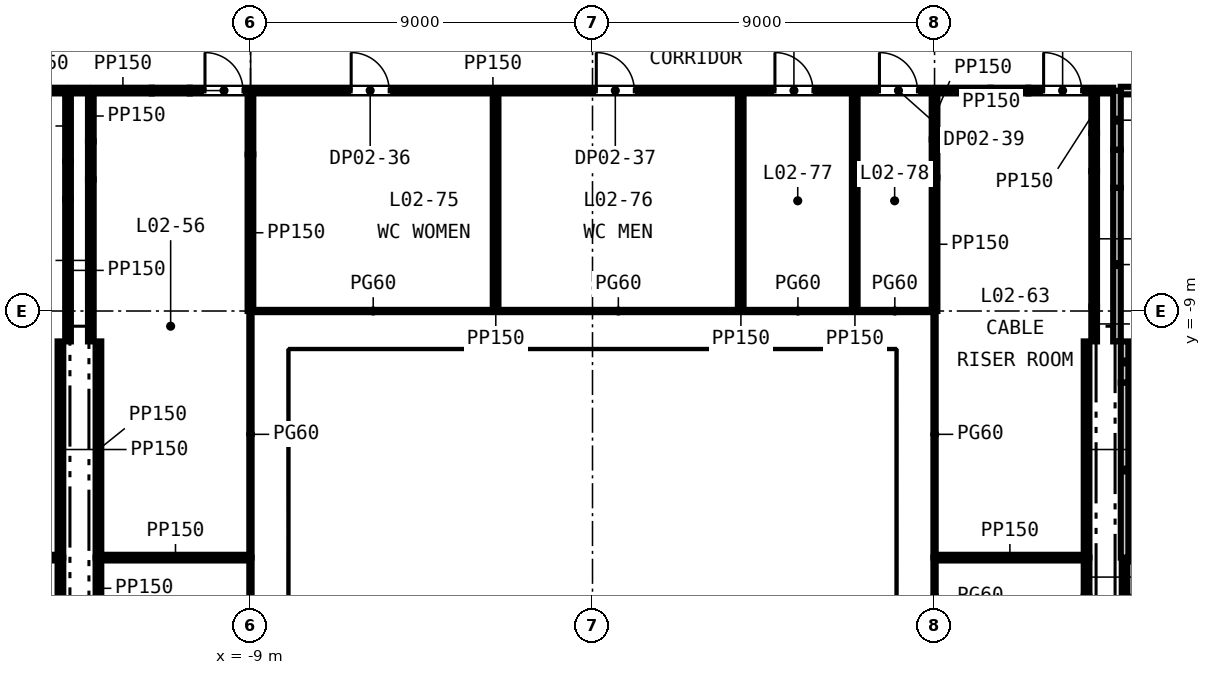
"""IFC4 building model, lengths in metres.
Left out: names, types, materials, properties, quantities, classifications, styles, units other than length and angle.
Written with IfcOpenShell. Run it as: python <this file> out.ifc"""

import sys

from ifc_helpers import new_model, si_unit, direction, frame, frame_2d, origin, place, context, subcontext, project, spatial, rectangle, extrude, element, fill, save


model = new_model("IFC4")
c1 = context("Model", 3, precision=1e-05, world=origin(), true_north=direction((0.0, 1.0)))
c2 = subcontext(c1, "Body", "Model", "MODEL_VIEW")
j1 = project(units=[si_unit("LENGTHUNIT", "METRE"), si_unit("PLANEANGLEUNIT", "RADIAN")], contexts=[c1])
p1 = place(None, origin())
s1 = spatial("IfcSite", under=j1, at=p1, CompositionType="ELEMENT")
p2 = place(p1, origin())
s2 = spatial("IfcBuilding", under=s1, at=p2, CompositionType="ELEMENT")
p3 = place(p2, frame((0.0, 0.0, 18.0)))
s3 = spatial("IfcBuildingStorey", under=s2, at=p3, CompositionType="ELEMENT", Elevation=18.0)
p4 = place(p3, frame((-21.925, -15.489, 0.0), z_axis=(0.0, 0.0, 1.0), x_axis=(1.0, 0.0, 0.0)))
e1 = element("IfcWall", 1, at=p4, inside=s3, PredefinedType="PARTITIONING", context=c2, shape_type="SweptSolid", body=[
    extrude(rectangle(XDim=7.85, YDim=0.15, at=frame_2d((3.925, 0.0))), origin(), (0.0, 0.0, 1.0), 4.2),
])
for number, where, z_axis, x_axis in (
    (2, (-12.925, -15.489, 0.0), (0.0, 0.0, 1.0), (1.0, 0.0, 0.0)),
    (3, (9.03, -15.489, 0.0), (0.0, 0.0, 1.0), (1.0, 0.0, 0.0)),
):
    element("IfcWall", number, at=place(p3, frame(where, z_axis=z_axis, x_axis=x_axis)), inside=s3, PredefinedType="PARTITIONING", context=c2, shape_type="SweptSolid", body=[
        extrude(rectangle(XDim=3.895, YDim=0.15, at=frame_2d((1.948, 0.0))), origin(), (0.0, 0.0, 1.0), 4.2),
    ])
p5 = place(p3, frame((14.1, -15.489, 0.0), z_axis=(0.0, 0.0, 1.0), x_axis=(1.0, 0.0, 0.0)))
e4 = element("IfcWall", 4, at=p5, inside=s3, PredefinedType="PARTITIONING", context=c2, shape_type="SweptSolid", body=[
    extrude(rectangle(XDim=4.44, YDim=0.2, at=frame_2d((2.22, 0.0))), origin(), (0.0, 0.0, 1.0), 4.2),
])
for number, where, z_axis, x_axis in (
    (5, (-8.925, -9.0, 0.0), (0.0, 0.0, 1.0), (1.0, 0.0, 0.0)),
    (6, (-2.475, -9.0, 0.0), (0.0, 0.0, 1.0), (1.0, 0.0, 0.0)),
):
    element("IfcWall", number, at=place(p3, frame(where, z_axis=z_axis, x_axis=x_axis)), inside=s3, PredefinedType="PARTITIONING", context=c2, shape_type="SweptSolid", body=[
        extrude(rectangle(XDim=6.3, YDim=0.06, at=frame_2d((3.15, 0.0))), origin(), (0.0, 0.0, 1.0), 4.2),
    ])
p6 = place(p3, frame((3.975, -9.0, 0.0), z_axis=(0.0, 0.0, 1.0), x_axis=(1.0, 0.0, 0.0)))
e7 = element("IfcWall", 7, at=p6, inside=s3, PredefinedType="PARTITIONING", context=c2, shape_type="SweptSolid", body=[
    extrude(rectangle(XDim=2.85, YDim=0.06, at=frame_2d((1.425, 0.0))), origin(), (0.0, 0.0, 1.0), 4.2),
])
p7 = place(p3, frame((6.975, -9.0, 0.0), z_axis=(0.0, 0.0, 1.0), x_axis=(1.0, 0.0, 0.0)))
e8 = element("IfcWall", 8, at=p7, inside=s3, PredefinedType="PARTITIONING", context=c2, shape_type="SweptSolid", body=[
    extrude(rectangle(XDim=1.95, YDim=0.06, at=frame_2d((0.975, 0.0))), origin(), (0.0, 0.0, 1.0), 4.2),
])
p8 = place(p3, frame((-15.228, -3.2, 0.0), z_axis=(0.0, 0.0, 1.0), x_axis=(1.0, 0.0, 0.0)))
e9 = element("IfcWall", 9, at=p8, inside=s3, PredefinedType="PARTITIONING", context=c2, shape_type="SweptSolid", body=[
    extrude(rectangle(XDim=1.353, YDim=0.15, at=frame_2d((0.676, 0.0))), origin(), (0.0, 0.0, 1.0), 4.2),
])
p9 = place(p3, frame((-13.725, -3.2, 0.0), z_axis=(0.0, 0.0, 1.0), x_axis=(1.0, 0.0, 0.0)))
e10 = element("IfcWall", 10, at=p9, inside=s3, PredefinedType="PARTITIONING", context=c2, shape_type="SweptSolid", body=[
    extrude(rectangle(XDim=0.45, YDim=0.15, at=frame_2d((0.225, 0.0))), origin(), (0.0, 0.0, 1.0), 4.2),
])
p10 = place(p3, frame((-13.125, -3.2, 0.0), z_axis=(0.0, 0.0, 1.0), x_axis=(1.0, 0.0, 0.0)))
e11 = element("IfcWall", 11, at=p10, inside=s3, PredefinedType="PARTITIONING", context=c2, shape_type="SweptSolid", body=[
    extrude(rectangle(XDim=1.529, YDim=0.15, at=frame_2d((0.764, 0.0))), origin(), (0.0, 0.0, 1.0), 4.2),
])
p11 = place(p3, frame((-11.596, -3.2, 0.0), z_axis=(0.0, 0.0, 1.0), x_axis=(1.0, 0.0, 0.0)))
e12 = element("IfcWall", 12, at=p11, inside=s3, PredefinedType="PARTITIONING", context=c2, shape_type="SweptSolid", body=[
    extrude(rectangle(XDim=1.0, YDim=0.15, at=frame_2d((0.5, 0.0))), origin(), (0.0, 0.0, 1.0), 3.298),
])
p12 = place(p3, frame((-10.596, -3.2, 0.0), z_axis=(0.0, 0.0, 1.0), x_axis=(1.0, 0.0, 0.0)))
e13 = element("IfcWall", 13, at=p12, inside=s3, PredefinedType="PARTITIONING", context=c2, shape_type="SweptSolid", body=[
    extrude(rectangle(XDim=21.066, YDim=0.15, at=frame_2d((10.533, 0.0))), origin(), (0.0, 0.0, 1.0), 4.2),
])
p13 = place(p12, frame((0.4, 0.0, 0.0)))
e14 = element("IfcOpeningElement", 14, at=p13, cuts=e13, PredefinedType="OPENING", context=c2, shape_type="SweptSolid", body=[
    extrude(rectangle(XDim=1.0, YDim=2.1, at=frame_2d((0.5, 1.05))), frame((0.0, 0.085, 0.0), z_axis=(0.0, -1.0, 0.0), x_axis=(1.0, 0.0, 0.0)), (0.0, 0.0, 1.0), 0.17),
])
p14 = place(p12, frame((4.246, 0.0, 0.0)))
e15 = element("IfcOpeningElement", 15, at=p14, cuts=e13, PredefinedType="OPENING", context=c2, shape_type="SweptSolid", body=[
    extrude(rectangle(XDim=1.0, YDim=2.1, at=frame_2d((0.5, 1.05))), frame((0.0, 0.085, 0.0), z_axis=(0.0, -1.0, 0.0), x_axis=(1.0, 0.0, 0.0)), (0.0, 0.0, 1.0), 0.17),
])
p15 = place(p12, frame((10.696, 0.0, 0.0)))
e16 = element("IfcOpeningElement", 16, at=p15, cuts=e13, PredefinedType="OPENING", context=c2, shape_type="SweptSolid", body=[
    extrude(rectangle(XDim=1.0, YDim=2.1, at=frame_2d((0.5, 1.05))), frame((0.0, 0.085, 0.0), z_axis=(0.0, -1.0, 0.0), x_axis=(1.0, 0.0, 0.0)), (0.0, 0.0, 1.0), 0.17),
])
p16 = place(p12, frame((15.396, 0.0, 0.0)))
e17 = element("IfcOpeningElement", 17, at=p16, cuts=e13, PredefinedType="OPENING", context=c2, shape_type="SweptSolid", body=[
    extrude(rectangle(XDim=1.0, YDim=2.1, at=frame_2d((0.5, 1.05))), frame((0.0, 0.085, 0.0), z_axis=(0.0, -1.0, 0.0), x_axis=(1.0, 0.0, 0.0)), (0.0, 0.0, 1.0), 0.17),
])
p17 = place(p12, frame((18.146, 0.0, 0.0)))
e18 = element("IfcOpeningElement", 18, at=p17, cuts=e13, PredefinedType="OPENING", context=c2, shape_type="SweptSolid", body=[
    extrude(rectangle(XDim=1.0, YDim=2.1, at=frame_2d((0.5, 1.05))), frame((0.0, 0.085, 0.0), z_axis=(0.0, -1.0, 0.0), x_axis=(1.0, 0.0, 0.0)), (0.0, 0.0, 1.0), 0.17),
])
p18 = place(p3, frame((10.47, -3.2, 0.0), z_axis=(0.0, 0.0, 1.0), x_axis=(1.0, 0.0, 0.0)))
e19 = element("IfcWall", 19, at=p18, inside=s3, PredefinedType="PARTITIONING", context=c2, shape_type="SweptSolid", body=[
    extrude(rectangle(XDim=1.0, YDim=0.15, at=frame_2d((0.5, 0.0))), origin(), (0.0, 0.0, 1.0), 3.298),
])
p19 = place(p3, frame((11.47, -3.2, 0.0), z_axis=(0.0, 0.0, 1.0), x_axis=(1.0, 0.0, 0.0)))
e20 = element("IfcWall", 20, at=p19, inside=s3, PredefinedType="PARTITIONING", context=c2, shape_type="SweptSolid", body=[
    extrude(rectangle(XDim=1.655, YDim=0.15, at=frame_2d((0.828, 0.0))), origin(), (0.0, 0.0, 1.0), 4.2),
])
p20 = place(p19, frame((0.4, 0.0, 0.0)))
e21 = element("IfcOpeningElement", 21, at=p20, cuts=e20, PredefinedType="OPENING", context=c2, shape_type="SweptSolid", body=[
    extrude(rectangle(XDim=1.0, YDim=2.1, at=frame_2d((0.5, 1.05))), frame((0.0, 0.085, 0.0), z_axis=(0.0, -1.0, 0.0), x_axis=(1.0, 0.0, 0.0)), (0.0, 0.0, 1.0), 0.17),
])
p21 = place(p3, frame((13.275, -3.2, 0.0), z_axis=(0.0, 0.0, 1.0), x_axis=(1.0, 0.0, 0.0)))
e22 = element("IfcWall", 22, at=p21, inside=s3, PredefinedType="PARTITIONING", context=c2, shape_type="SweptSolid", body=[
    extrude(rectangle(XDim=0.425, YDim=0.15, at=frame_2d((0.212, 0.0))), origin(), (0.0, 0.0, 1.0), 4.2),
])
p22 = place(p3, frame((13.9, -3.2, 0.0), z_axis=(0.0, 0.0, 1.0), x_axis=(1.0, 0.0, 0.0)))
e23 = element("IfcWall", 23, at=p22, inside=s3, PredefinedType="PARTITIONING", context=c2, shape_type="SweptSolid", body=[
    extrude(rectangle(XDim=2.66, YDim=0.2, at=frame_2d((1.33, 0.0))), origin(), (0.0, 0.0, 1.0), 4.2),
])
p23 = place(p22, frame((0.4, 0.0, 0.0)))
e24 = element("IfcOpeningElement", 24, at=p23, cuts=e23, PredefinedType="OPENING", context=c2, shape_type="SweptSolid", body=[
    extrude(rectangle(XDim=1.8, YDim=2.4, at=frame_2d((0.9, 1.2))), frame((0.0, 0.11, 0.0), z_axis=(0.0, -1.0, 0.0), x_axis=(1.0, 0.0, 0.0)), (0.0, 0.0, 1.0), 0.22),
])
p24 = place(p3, frame((-14.0, -17.961, 0.0), z_axis=(0.0, 0.0, 1.0), x_axis=(0.0, 1.0, 0.0)))
e25 = element("IfcWall", 25, at=p24, inside=s3, PredefinedType="PARTITIONING", context=c2, shape_type="SweptSolid", body=[
    extrude(rectangle(XDim=2.47, YDim=0.15, at=frame_2d((1.235, 0.0))), origin(), (0.0, 0.0, 1.0), 4.2),
])
p25 = place(p3, frame((-14.0, -15.489, 0.0), z_axis=(0.0, 0.0, 1.0), x_axis=(0.0, 1.0, 0.0)))
e26 = element("IfcWall", 26, at=p25, inside=s3, PredefinedType="PARTITIONING", context=c2, shape_type="SweptSolid", body=[
    extrude(rectangle(XDim=5.688, YDim=0.15, at=frame_2d((2.844, 0.0))), origin(), (0.0, 0.0, 1.0), 4.2),
])
p26 = place(p3, frame((-13.8, -9.8, 0.0), z_axis=(0.0, 0.0, 1.0), x_axis=(0.0, 1.0, 0.0)))
e27 = element("IfcWall", 27, at=p26, inside=s3, PredefinedType="PARTITIONING", context=c2, shape_type="SweptSolid", body=[
    extrude(rectangle(XDim=3.738, YDim=0.15, at=frame_2d((1.869, 0.0))), origin(), (0.0, 0.0, 1.0), 4.2),
])
p27 = place(p3, frame((-13.8, -6.062, 0.0), z_axis=(0.0, 0.0, 1.0), x_axis=(0.0, 1.0, 0.0)))
e28 = element("IfcWall", 28, at=p27, inside=s3, PredefinedType="PARTITIONING", context=c2, shape_type="SweptSolid", body=[
    extrude(rectangle(XDim=1.0, YDim=0.15, at=frame_2d((0.5, 0.0))), origin(), (0.0, 0.0, 1.0), 3.298),
])
p28 = place(p3, frame((-13.8, -5.062, 0.0), z_axis=(0.0, 0.0, 1.0), x_axis=(0.0, 1.0, 0.0)))
e29 = element("IfcWall", 29, at=p28, inside=s3, PredefinedType="PARTITIONING", context=c2, shape_type="SweptSolid", body=[
    extrude(rectangle(XDim=1.861, YDim=0.15, at=frame_2d((0.931, 0.0))), origin(), (0.0, 0.0, 1.0), 4.2),
])
p29 = place(p3, frame((-13.2, -9.8, 0.0), z_axis=(0.0, 0.0, 1.0), x_axis=(0.0, 1.0, 0.0)))
e30 = element("IfcWall", 30, at=p29, inside=s3, PredefinedType="PARTITIONING", context=c2, shape_type="SweptSolid", body=[
    extrude(rectangle(XDim=4.262, YDim=0.15, at=frame_2d((2.131, 0.0))), origin(), (0.0, 0.0, 1.0), 4.2),
])
p30 = place(p3, frame((-13.2, -5.538, 0.0), z_axis=(0.0, 0.0, 1.0), x_axis=(0.0, 1.0, 0.0)))
e31 = element("IfcWall", 31, at=p30, inside=s3, PredefinedType="PARTITIONING", context=c2, shape_type="SweptSolid", body=[
    extrude(rectangle(XDim=1.0, YDim=0.15, at=frame_2d((0.5, 0.0))), origin(), (0.0, 0.0, 1.0), 3.298),
])
p31 = place(p3, frame((-13.2, -4.538, 0.0), z_axis=(0.0, 0.0, 1.0), x_axis=(0.0, 1.0, 0.0)))
e32 = element("IfcWall", 32, at=p31, inside=s3, PredefinedType="PARTITIONING", context=c2, shape_type="SweptSolid", body=[
    extrude(rectangle(XDim=1.337, YDim=0.15, at=frame_2d((0.668, 0.0))), origin(), (0.0, 0.0, 1.0), 4.2),
])
p32 = place(p3, frame((-13.0, -17.102, 0.0), z_axis=(0.0, 0.0, 1.0), x_axis=(0.0, 1.0, 0.0)))
e33 = element("IfcWall", 33, at=p32, inside=s3, PredefinedType="PARTITIONING", context=c2, shape_type="SweptSolid", body=[
    extrude(rectangle(XDim=1.612, YDim=0.15, at=frame_2d((0.806, 0.0))), origin(), (0.0, 0.0, 1.0), 3.749),
])
p33 = place(p3, frame((-13.0, -15.489, 0.0), z_axis=(0.0, 0.0, 1.0), x_axis=(0.0, 1.0, 0.0)))
e34 = element("IfcWall", 34, at=p33, inside=s3, PredefinedType="PARTITIONING", context=c2, shape_type="SweptSolid", body=[
    extrude(rectangle(XDim=5.688, YDim=0.15, at=frame_2d((2.844, 0.0))), origin(), (0.0, 0.0, 1.0), 4.2),
])
p34 = place(p3, frame((-9.0, -18.321, 0.0), z_axis=(0.0, 0.0, 1.0), x_axis=(0.0, 1.0, 0.0)))
e35 = element("IfcWall", 35, at=p34, inside=s3, PredefinedType="PARTITIONING", context=c2, shape_type="SweptSolid", body=[
    extrude(rectangle(XDim=2.831, YDim=0.06, at=frame_2d((1.416, 0.0))), origin(), (0.0, 0.0, 1.0), 4.2),
])
p35 = place(p3, frame((-9.0, -15.489, 0.0), z_axis=(0.0, 0.0, 1.0), x_axis=(0.0, 1.0, 0.0)))
e36 = element("IfcWall", 36, at=p35, inside=s3, PredefinedType="PARTITIONING", context=c2, shape_type="SweptSolid", body=[
    extrude(rectangle(XDim=6.488, YDim=0.06, at=frame_2d((3.244, 0.0))), origin(), (0.0, 0.0, 1.0), 4.2),
])
p36 = place(p3, frame((-9.0, -9.0, 0.0), z_axis=(0.0, 0.0, 1.0), x_axis=(0.0, 1.0, 0.0)))
e37 = element("IfcWall", 37, at=p36, inside=s3, PredefinedType="PARTITIONING", context=c2, shape_type="SweptSolid", body=[
    extrude(rectangle(XDim=4.119, YDim=0.15, at=frame_2d((2.06, 0.0))), origin(), (0.0, 0.0, 1.0), 4.2),
])
p37 = place(p3, frame((-9.0, -4.881, 0.0), z_axis=(0.0, 0.0, 1.0), x_axis=(0.0, 1.0, 0.0)))
e38 = element("IfcWall", 38, at=p37, inside=s3, PredefinedType="PARTITIONING", context=c2, shape_type="SweptSolid", body=[
    extrude(rectangle(XDim=1.606, YDim=0.15, at=frame_2d((0.803, 0.0))), origin(), (0.0, 0.0, 1.0), 3.6),
])
for number, where, z_axis, x_axis in (
    (39, (-2.55, -9.0, 0.0), (0.0, 0.0, 1.0), (0.0, 1.0, 0.0)),
    (40, (3.9, -9.0, 0.0), (0.0, 0.0, 1.0), (0.0, 1.0, 0.0)),
    (41, (6.9, -9.0, 0.0), (0.0, 0.0, 1.0), (0.0, 1.0, 0.0)),
):
    element("IfcWall", number, at=place(p3, frame(where, z_axis=z_axis, x_axis=x_axis)), inside=s3, PredefinedType="PARTITIONING", context=c2, shape_type="SweptSolid", body=[
        extrude(rectangle(XDim=5.725, YDim=0.15, at=frame_2d((2.863, 0.0))), origin(), (0.0, 0.0, 1.0), 4.2),
    ])
p38 = place(p3, frame((9.0, -17.525, 0.0), z_axis=(0.0, 0.0, 1.0), x_axis=(0.0, 1.0, 0.0)))
e42 = element("IfcWall", 42, at=p38, inside=s3, PredefinedType="PARTITIONING", context=c2, shape_type="SweptSolid", body=[
    extrude(rectangle(XDim=2.034, YDim=0.06, at=frame_2d((1.017, 0.0))), origin(), (0.0, 0.0, 1.0), 4.2),
])
p39 = place(p3, frame((9.0, -15.489, 0.0), z_axis=(0.0, 0.0, 1.0), x_axis=(0.0, 1.0, 0.0)))
e43 = element("IfcWall", 43, at=p39, inside=s3, PredefinedType="PARTITIONING", context=c2, shape_type="SweptSolid", body=[
    extrude(rectangle(XDim=6.488, YDim=0.06, at=frame_2d((3.244, 0.0))), origin(), (0.0, 0.0, 1.0), 4.2),
])
p40 = place(p3, frame((9.0, -9.0, 0.0), z_axis=(0.0, 0.0, 1.0), x_axis=(0.0, 1.0, 0.0)))
e44 = element("IfcWall", 44, at=p40, inside=s3, PredefinedType="PARTITIONING", context=c2, shape_type="SweptSolid", body=[
    extrude(rectangle(XDim=3.513, YDim=0.15, at=frame_2d((1.756, 0.0))), origin(), (0.0, 0.0, 1.0), 4.2),
])
p41 = place(p3, frame((9.0, -5.487, 0.0), z_axis=(0.0, 0.0, 1.0), x_axis=(0.0, 1.0, 0.0)))
e45 = element("IfcWall", 45, at=p41, inside=s3, PredefinedType="PARTITIONING", context=c2, shape_type="SweptSolid", body=[
    extrude(rectangle(XDim=1.0, YDim=0.15, at=frame_2d((0.5, 0.0))), origin(), (0.0, 0.0, 1.0), 3.451),
])
p42 = place(p3, frame((9.0, -4.487, 0.0), z_axis=(0.0, 0.0, 1.0), x_axis=(0.0, 1.0, 0.0)))
e46 = element("IfcWall", 46, at=p42, inside=s3, PredefinedType="PARTITIONING", context=c2, shape_type="SweptSolid", body=[
    extrude(rectangle(XDim=1.212, YDim=0.15, at=frame_2d((0.606, 0.0))), origin(), (0.0, 0.0, 1.0), 4.2),
])
p43 = place(p3, frame((13.0, -16.511, 0.0), z_axis=(0.0, 0.0, 1.0), x_axis=(0.0, 1.0, 0.0)))
e47 = element("IfcWall", 47, at=p43, inside=s3, PredefinedType="PARTITIONING", context=c2, shape_type="SweptSolid", body=[
    extrude(rectangle(XDim=1.021, YDim=0.15, at=frame_2d((0.51, 0.0))), origin(), (0.0, 0.0, 1.0), 3.797),
])
p44 = place(p3, frame((13.0, -15.489, 0.0), z_axis=(0.0, 0.0, 1.0), x_axis=(0.0, 1.0, 0.0)))
e48 = element("IfcWall", 48, at=p44, inside=s3, PredefinedType="PARTITIONING", context=c2, shape_type="SweptSolid", body=[
    extrude(rectangle(XDim=5.688, YDim=0.15, at=frame_2d((2.844, 0.0))), origin(), (0.0, 0.0, 1.0), 4.2),
])
p45 = place(p3, frame((13.2, -9.8, 0.0), z_axis=(0.0, 0.0, 1.0), x_axis=(0.0, 1.0, 0.0)))
e49 = element("IfcWall", 49, at=p45, inside=s3, PredefinedType="PARTITIONING", context=c2, shape_type="SweptSolid", body=[
    extrude(rectangle(XDim=0.92, YDim=0.15, at=frame_2d((0.46, 0.0))), origin(), (0.0, 0.0, 1.0), 3.451),
])
p46 = place(p3, frame((13.2, -8.88, 0.0), z_axis=(0.0, 0.0, 1.0), x_axis=(0.0, 1.0, 0.0)))
e50 = element("IfcWall", 50, at=p46, inside=s3, PredefinedType="PARTITIONING", context=c2, shape_type="SweptSolid", body=[
    extrude(rectangle(XDim=3.56, YDim=0.15, at=frame_2d((1.78, 0.0))), origin(), (0.0, 0.0, 1.0), 4.2),
])
p47 = place(p3, frame((13.2, -5.32, 0.0), z_axis=(0.0, 0.0, 1.0), x_axis=(0.0, 1.0, 0.0)))
e51 = element("IfcWall", 51, at=p47, inside=s3, PredefinedType="PARTITIONING", context=c2, shape_type="SweptSolid", body=[
    extrude(rectangle(XDim=1.0, YDim=0.15, at=frame_2d((0.5, 0.0))), origin(), (0.0, 0.0, 1.0), 3.298),
])
p48 = place(p3, frame((13.2, -4.32, 0.0), z_axis=(0.0, 0.0, 1.0), x_axis=(0.0, 1.0, 0.0)))
e52 = element("IfcWall", 52, at=p48, inside=s3, PredefinedType="PARTITIONING", context=c2, shape_type="SweptSolid", body=[
    extrude(rectangle(XDim=1.119, YDim=0.15, at=frame_2d((0.56, 0.0))), origin(), (0.0, 0.0, 1.0), 4.2),
])
p49 = place(p3, frame((13.8, -9.8, 0.0), z_axis=(0.0, 0.0, 1.0), x_axis=(0.0, 1.0, 0.0)))
e53 = element("IfcWall", 53, at=p49, inside=s3, PredefinedType="PARTITIONING", context=c2, shape_type="SweptSolid", body=[
    extrude(rectangle(XDim=4.044, YDim=0.2, at=frame_2d((2.022, 0.0))), origin(), (0.0, 0.0, 1.0), 4.2),
])
p50 = place(p3, frame((13.8, -5.756, 0.0), z_axis=(0.0, 0.0, 1.0), x_axis=(0.0, 1.0, 0.0)))
e54 = element("IfcWall", 54, at=p50, inside=s3, PredefinedType="PARTITIONING", context=c2, shape_type="SweptSolid", body=[
    extrude(rectangle(XDim=1.0, YDim=0.2, at=frame_2d((0.5, 0.0))), origin(), (0.0, 0.0, 1.0), 3.298),
])
p51 = place(p3, frame((13.8, -4.756, 0.0), z_axis=(0.0, 0.0, 1.0), x_axis=(0.0, 1.0, 0.0)))
e55 = element("IfcWall", 55, at=p51, inside=s3, PredefinedType="PARTITIONING", context=c2, shape_type="SweptSolid", body=[
    extrude(rectangle(XDim=1.555, YDim=0.2, at=frame_2d((0.778, 0.0))), origin(), (0.0, 0.0, 1.0), 4.2),
])
p52 = place(p3, frame((14.0, -16.789, 0.0), z_axis=(0.0, 0.0, 1.0), x_axis=(0.0, 1.0, 0.0)))
e56 = element("IfcWall", 56, at=p52, inside=s3, PredefinedType="PARTITIONING", context=c2, shape_type="SweptSolid", body=[
    extrude(rectangle(XDim=1.298, YDim=0.15, at=frame_2d((0.649, 0.0))), origin(), (0.0, 0.0, 1.0), 4.2),
])
p53 = place(p3, frame((14.0, -15.489, 0.0), z_axis=(0.0, 0.0, 1.0), x_axis=(0.0, 1.0, 0.0)))
e57 = element("IfcWall", 57, at=p53, inside=s3, PredefinedType="PARTITIONING", context=c2, shape_type="SweptSolid", body=[
    extrude(rectangle(XDim=4.607, YDim=0.2, at=frame_2d((2.303, 0.0))), origin(), (0.0, 0.0, 1.0), 4.2),
])
p54 = place(p3, frame((14.0, -10.882, 0.0), z_axis=(0.0, 0.0, 1.0), x_axis=(0.0, 1.0, 0.0)))
e58 = element("IfcWall", 58, at=p54, inside=s3, PredefinedType="PARTITIONING", context=c2, shape_type="SweptSolid", body=[
    extrude(rectangle(XDim=1.082, YDim=0.2, at=frame_2d((0.541, 0.0))), origin(), (0.0, 0.0, 1.0), 3.451),
])
p55 = place(p13, origin())
e59 = element("IfcDoor", 59, at=p55, inside=s3, OperationType="SINGLE_SWING_LEFT", PredefinedType="DOOR", context=c2, shape_type="SweptSolid", body=[
    extrude(rectangle(XDim=1.0, YDim=2.1, at=frame_2d((0.5, 1.05))), frame((0.0, 0.025, 0.0), z_axis=(0.0, -1.0, 0.0), x_axis=(1.0, 0.0, 0.0)), (0.0, 0.0, 1.0), 0.05),
])
fill(e14, e59)
p56 = place(p20, origin())
e60 = element("IfcDoor", 60, at=p56, inside=s3, OperationType="SINGLE_SWING_LEFT", PredefinedType="DOOR", context=c2, shape_type="SweptSolid", body=[
    extrude(rectangle(XDim=1.0, YDim=2.1, at=frame_2d((0.5, 1.05))), frame((0.0, 0.025, 0.0), z_axis=(0.0, -1.0, 0.0), x_axis=(1.0, 0.0, 0.0)), (0.0, 0.0, 1.0), 0.05),
])
fill(e21, e60)
p57 = place(p14, origin())
e61 = element("IfcDoor", 61, at=p57, inside=s3, OperationType="SINGLE_SWING_LEFT", PredefinedType="DOOR", context=c2, shape_type="SweptSolid", body=[
    extrude(rectangle(XDim=1.0, YDim=2.1, at=frame_2d((0.5, 1.05))), frame((0.0, 0.025, 0.0), z_axis=(0.0, -1.0, 0.0), x_axis=(1.0, 0.0, 0.0)), (0.0, 0.0, 1.0), 0.05),
])
fill(e15, e61)
p58 = place(p15, origin())
e62 = element("IfcDoor", 62, at=p58, inside=s3, OperationType="SINGLE_SWING_LEFT", PredefinedType="DOOR", context=c2, shape_type="SweptSolid", body=[
    extrude(rectangle(XDim=1.0, YDim=2.1, at=frame_2d((0.5, 1.05))), frame((0.0, 0.025, 0.0), z_axis=(0.0, -1.0, 0.0), x_axis=(1.0, 0.0, 0.0)), (0.0, 0.0, 1.0), 0.05),
])
fill(e16, e62)
p59 = place(p16, origin())
e63 = element("IfcDoor", 63, at=p59, inside=s3, OperationType="SINGLE_SWING_LEFT", PredefinedType="DOOR", context=c2, shape_type="SweptSolid", body=[
    extrude(rectangle(XDim=1.0, YDim=2.1, at=frame_2d((0.5, 1.05))), frame((0.0, 0.025, 0.0), z_axis=(0.0, -1.0, 0.0), x_axis=(1.0, 0.0, 0.0)), (0.0, 0.0, 1.0), 0.05),
])
fill(e17, e63)
p60 = place(p17, origin())
e64 = element("IfcDoor", 64, at=p60, inside=s3, OperationType="SINGLE_SWING_LEFT", PredefinedType="DOOR", context=c2, shape_type="SweptSolid", body=[
    extrude(rectangle(XDim=1.0, YDim=2.1, at=frame_2d((0.5, 1.05))), frame((0.0, 0.025, 0.0), z_axis=(0.0, -1.0, 0.0), x_axis=(1.0, 0.0, 0.0)), (0.0, 0.0, 1.0), 0.05),
])
fill(e18, e64)
save(model, sys.argv[1])
